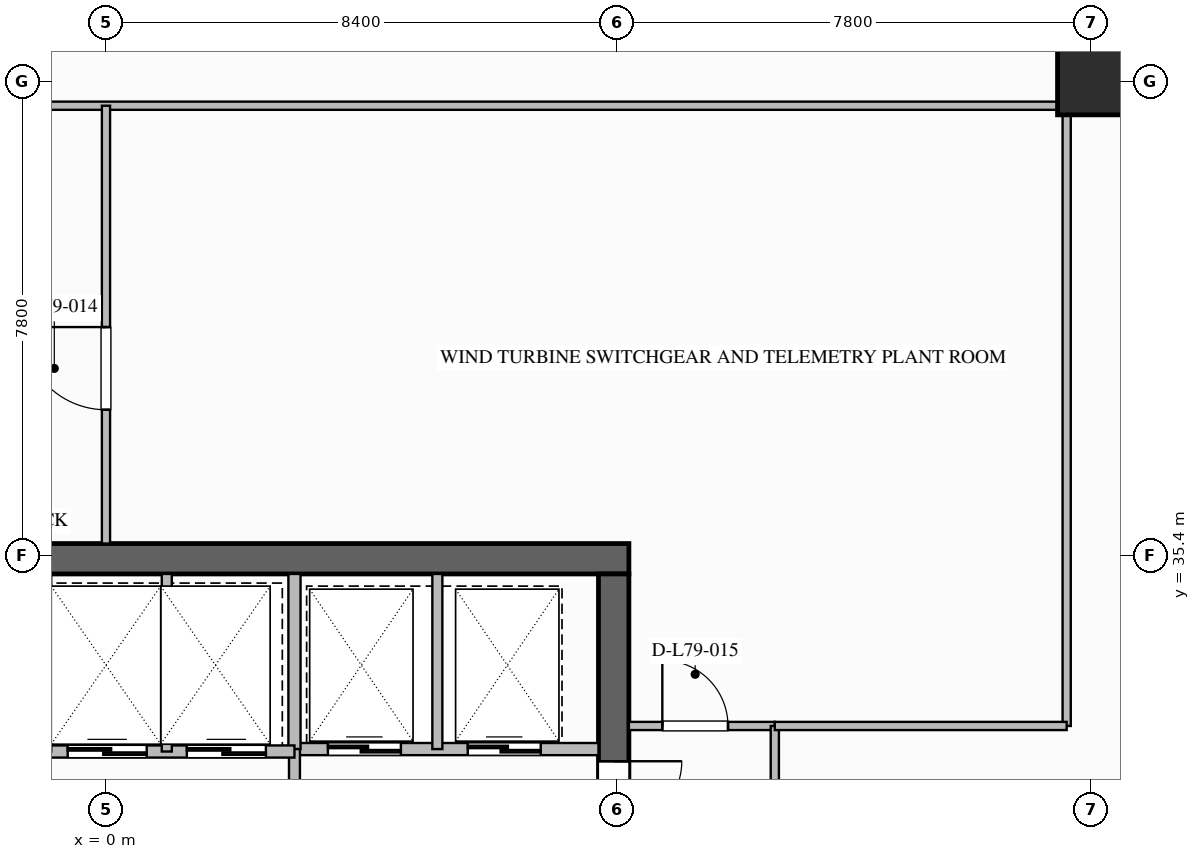
"""IFC4 building model, lengths in metres.
Left out: names, types, materials, properties, quantities, classifications, styles, units other than length and angle.
Written with IfcOpenShell. Run it as: python <this file> out.ifc"""

import sys

from ifc_helpers import new_model, si_unit, direction, frame, frame_2d, origin, origin_2d, place, context, subcontext, project, spatial, rectangle, extrude, element, fill, save


model = new_model("IFC4")
c1 = context("Model", 3, precision=1e-05, world=origin(), true_north=direction((0.0, 1.0)))
c2 = subcontext(c1, "Body", "Model", "MODEL_VIEW")
j1 = project(units=[si_unit("LENGTHUNIT", "METRE"), si_unit("PLANEANGLEUNIT", "RADIAN")], contexts=[c1])
p1 = place(None, origin())
s1 = spatial("IfcSite", under=j1, at=p1, CompositionType="ELEMENT")
p2 = place(p1, origin())
s2 = spatial("IfcBuilding", under=s1, at=p2, CompositionType="ELEMENT")
p3 = place(p2, frame((0.0, 0.0, 303.0)))
s3 = spatial("IfcBuildingStorey", under=s2, at=p3, CompositionType="ELEMENT", Elevation=303.0)
p4 = place(p3, frame((-8.6, 35.35, 0.0), z_axis=(0.0, 0.0, 1.0), x_axis=(1.0, 0.0, 0.0)))
e1 = element("IfcWall", 1, at=p4, inside=s3, PredefinedType="SHEAR", context=c2, shape_type="SweptSolid", body=[
    extrude(rectangle(XDim=17.2, YDim=0.5, at=frame_2d((8.6, 0.0))), origin(), (0.0, 0.0, 1.0), 4.2),
])
p5 = place(p3, frame((8.35, 35.1, 0.0), z_axis=(0.0, 0.0, 1.0), x_axis=(0.0, -1.0, 0.0)))
e2 = element("IfcWall", 2, at=p5, inside=s3, PredefinedType="SHEAR", context=c2, shape_type="SweptSolid", body=[
    extrude(rectangle(XDim=16.2, YDim=0.5, at=frame_2d((8.1, 0.0))), origin(), (0.0, 0.0, 1.0), 4.2),
])
p6 = place(p5, frame((3.08, 0.0, 0.0)))
e3 = element("IfcOpeningElement", 3, at=p6, cuts=e2, PredefinedType="OPENING", context=c2, shape_type="SweptSolid", body=[
    extrude(rectangle(XDim=1.12, YDim=2.1, at=frame_2d((0.56, 1.05))), frame((0.0, 0.26, 0.0), z_axis=(0.0, -1.0, 0.0), x_axis=(1.0, 0.0, 0.0)), (0.0, 0.0, 1.0), 0.52),
])
p7 = place(p5, frame((10.62, 0.0, 0.0)))
e4 = element("IfcOpeningElement", 4, at=p7, cuts=e2, PredefinedType="OPENING", context=c2, shape_type="SweptSolid", body=[
    extrude(rectangle(XDim=1.08, YDim=2.04, at=frame_2d((0.54, 1.02))), frame((0.0, 0.26, 0.0), z_axis=(0.0, -1.0, 0.0), x_axis=(1.0, 0.0, 0.0)), (0.0, 0.0, 1.0), 0.52),
])
p8 = place(p3, frame((16.2, 43.2, 0.0), z_axis=(0.0, 0.0, 1.0), x_axis=(1.0, 0.0, 0.0)))
e5 = element("IfcColumn", 5, at=p8, inside=s3, PredefinedType="COLUMN", context=c2, shape_type="SweptSolid", body=[
    extrude(rectangle(XDim=1.1, YDim=1.1, at=origin_2d()), origin(), (0.0, 0.0, 1.0), 4.2),
])
p9 = place(p3, frame((3.1, 32.22, 0.0), z_axis=(0.0, 0.0, 1.0), x_axis=(1.0, 0.0, 0.0)))
e6 = element("IfcWall", 6, at=p9, inside=s3, PredefinedType="SOLIDWALL", context=c2, shape_type="SweptSolid", body=[
    extrude(rectangle(XDim=5.0, YDim=0.2, at=frame_2d((2.5, 0.0))), origin(), (0.0, 0.0, 1.0), 3.85),
])
p10 = place(p9, frame((0.55, 0.0, 0.0)))
e7 = element("IfcOpeningElement", 7, at=p10, cuts=e6, PredefinedType="OPENING", context=c2, shape_type="SweptSolid", body=[
    extrude(rectangle(XDim=1.2, YDim=2.2, at=frame_2d((0.6, 1.1))), frame((0.0, 0.11, 0.0), z_axis=(0.0, -1.0, 0.0), x_axis=(1.0, 0.0, 0.0)), (0.0, 0.0, 1.0), 0.22),
])
p11 = place(p9, frame((2.85, 0.0, 0.0)))
e8 = element("IfcOpeningElement", 8, at=p11, cuts=e6, PredefinedType="OPENING", context=c2, shape_type="SweptSolid", body=[
    extrude(rectangle(XDim=1.2, YDim=2.2, at=frame_2d((0.6, 1.1))), frame((0.0, 0.11, 0.0), z_axis=(0.0, -1.0, 0.0), x_axis=(1.0, 0.0, 0.0)), (0.0, 0.0, 1.0), 0.22),
])
p12 = place(p3, frame((3.1, 32.22, 0.0), z_axis=(0.0, 0.0, 1.0), x_axis=(0.0, 1.0, 0.0)))
e9 = element("IfcWall", 9, at=p12, inside=s3, PredefinedType="SOLIDWALL", context=c2, shape_type="SweptSolid", body=[
    extrude(rectangle(XDim=2.88, YDim=0.2, at=frame_2d((1.44, 0.0))), origin(), (0.0, 0.0, 1.0), 3.85),
])
p13 = place(p3, frame((5.45, 32.22, 0.0), z_axis=(0.0, 0.0, 1.0), x_axis=(0.0, 1.0, 0.0)))
e10 = element("IfcWall", 10, at=p13, inside=s3, PredefinedType="PARTITIONING", context=c2, shape_type="SweptSolid", body=[
    extrude(rectangle(XDim=2.88, YDim=0.165, at=frame_2d((1.44, 0.0))), origin(), (0.0, 0.0, 1.0), 3.85),
])
p14 = place(p3, frame((3.1, 28.16, 0.0), z_axis=(0.0, 0.0, 1.0), x_axis=(0.0, 1.0, 0.0)))
e11 = element("IfcWall", 11, at=p14, inside=s3, PredefinedType="SOLIDWALL", context=c2, shape_type="SweptSolid", body=[
    extrude(rectangle(XDim=4.06, YDim=0.18, at=frame_2d((2.03, 0.0))), origin(), (0.0, 0.0, 1.0), 3.85),
])
p15 = place(p14, frame((1.4, 0.0, 0.0)))
e12 = element("IfcOpeningElement", 12, at=p15, cuts=e11, PredefinedType="OPENING", context=c2, shape_type="SweptSolid", body=[
    extrude(rectangle(XDim=1.12, YDim=2.1, at=frame_2d((0.56, 1.05))), frame((0.0, 0.1, 0.0), z_axis=(0.0, -1.0, 0.0), x_axis=(1.0, 0.0, 0.0)), (0.0, 0.0, 1.0), 0.2),
])
p16 = place(p3, frame((-1.0, 32.18, 0.0), z_axis=(0.0, 0.0, 1.0), x_axis=(1.0, 0.0, 0.0)))
e13 = element("IfcWall", 13, at=p16, inside=s3, PredefinedType="SOLIDWALL", context=c2, shape_type="SweptSolid", body=[
    extrude(rectangle(XDim=4.1, YDim=0.2, at=frame_2d((2.05, 0.0))), origin(), (0.0, 0.0, 1.0), 3.85),
])
p17 = place(p16, frame((0.37, 0.0, 0.0)))
e14 = element("IfcOpeningElement", 14, at=p17, cuts=e13, PredefinedType="OPENING", context=c2, shape_type="SweptSolid", body=[
    extrude(rectangle(XDim=1.3, YDim=2.2, at=frame_2d((0.65, 1.1))), frame((0.0, 0.11, 0.0), z_axis=(0.0, -1.0, 0.0), x_axis=(1.0, 0.0, 0.0)), (0.0, 0.0, 1.0), 0.22),
])
p18 = place(p16, frame((2.33, 0.0, 0.0)))
e15 = element("IfcOpeningElement", 15, at=p18, cuts=e13, PredefinedType="OPENING", context=c2, shape_type="SweptSolid", body=[
    extrude(rectangle(XDim=1.3, YDim=2.2, at=frame_2d((0.65, 1.1))), frame((0.0, 0.11, 0.0), z_axis=(0.0, -1.0, 0.0), x_axis=(1.0, 0.0, 0.0)), (0.0, 0.0, 1.0), 0.22),
])
p19 = place(p3, frame((1.0, 32.18, 0.0), z_axis=(0.0, 0.0, 1.0), x_axis=(0.0, 1.0, 0.0)))
e16 = element("IfcWall", 16, at=p19, inside=s3, PredefinedType="PARTITIONING", context=c2, shape_type="SweptSolid", body=[
    extrude(rectangle(XDim=2.92, YDim=0.165, at=frame_2d((1.46, 0.0))), origin(), (0.0, 0.0, 1.0), 3.85),
])
p20 = place(p3, frame((8.6, 32.6, 0.0), z_axis=(0.0, 0.0, 1.0), x_axis=(1.0, 0.0, 0.0)))
e17 = element("IfcWall", 17, at=p20, inside=s3, PredefinedType="PARTITIONING", context=c2, shape_type="SweptSolid", body=[
    extrude(rectangle(XDim=2.4, YDim=0.135, at=frame_2d((1.2, 0.0))), origin(), (0.0, 0.0, 1.0), 3.85),
])
p21 = place(p20, frame((0.55, 0.0, 0.0)))
e18 = element("IfcOpeningElement", 18, at=p21, cuts=e17, PredefinedType="OPENING", context=c2, shape_type="SweptSolid", body=[
    extrude(rectangle(XDim=1.08, YDim=2.04, at=frame_2d((0.54, 1.02))), frame((0.0, 0.077, 0.0), z_axis=(0.0, -1.0, 0.0), x_axis=(1.0, 0.0, 0.0)), (0.0, 0.0, 1.0), 0.155),
])
p22 = place(p3, frame((11.0, 32.6, 0.0), z_axis=(0.0, 0.0, 1.0), x_axis=(0.0, -1.0, 0.0)))
e19 = element("IfcWall", 19, at=p22, inside=s3, PredefinedType="PARTITIONING", context=c2, shape_type="SweptSolid", body=[
    extrude(rectangle(XDim=10.2, YDim=0.135, at=frame_2d((5.1, 0.0))), origin(), (0.0, 0.0, 1.0), 3.85),
])
p23 = place(p22, frame((1.6, 0.0, 0.0)))
e20 = element("IfcOpeningElement", 20, at=p23, cuts=e19, PredefinedType="OPENING", context=c2, shape_type="SweptSolid", body=[
    extrude(rectangle(XDim=1.15, YDim=2.15, at=frame_2d((0.575, 1.075))), frame((0.0, 0.077, 0.0), z_axis=(0.0, -1.0, 0.0), x_axis=(1.0, 0.0, 0.0)), (0.0, 0.0, 1.0), 0.155),
])
p24 = place(p3, frame((-15.8, 42.8, 0.0), z_axis=(0.0, 0.0, 1.0), x_axis=(1.0, 0.0, 0.0)))
e21 = element("IfcWall", 21, at=p24, inside=s3, PredefinedType="PARTITIONING", context=c2, shape_type="SweptSolid", body=[
    extrude(rectangle(XDim=31.6, YDim=0.135, at=frame_2d((15.8, 0.0))), origin(), (0.0, 0.0, 1.0), 3.85),
])
p25 = place(p3, frame((15.8, 32.6, 0.0), z_axis=(0.0, 0.0, 1.0), x_axis=(0.0, 1.0, 0.0)))
e22 = element("IfcWall", 22, at=p25, inside=s3, PredefinedType="PARTITIONING", context=c2, shape_type="SweptSolid", body=[
    extrude(rectangle(XDim=10.2, YDim=0.135, at=frame_2d((5.1, 0.0))), origin(), (0.0, 0.0, 1.0), 3.85),
])
p26 = place(p3, frame((11.0, 32.6, 0.0), z_axis=(0.0, 0.0, 1.0), x_axis=(1.0, 0.0, 0.0)))
e23 = element("IfcWall", 23, at=p26, inside=s3, PredefinedType="PARTITIONING", context=c2, shape_type="SweptSolid", body=[
    extrude(rectangle(XDim=4.8, YDim=0.135, at=frame_2d((2.4, 0.0))), origin(), (0.0, 0.0, 1.0), 3.85),
])
p27 = place(p3, frame((0.0, 35.6, 0.0), z_axis=(0.0, 0.0, 1.0), x_axis=(0.0, 1.0, 0.0)))
e24 = element("IfcWall", 24, at=p27, inside=s3, PredefinedType="PARTITIONING", context=c2, shape_type="SweptSolid", body=[
    extrude(rectangle(XDim=7.2, YDim=0.135, at=frame_2d((3.6, 0.0))), origin(), (0.0, 0.0, 1.0), 3.227),
])
p28 = place(p27, frame((2.2, 0.0, 0.0)))
e25 = element("IfcOpeningElement", 25, at=p28, cuts=e24, PredefinedType="OPENING", context=c2, shape_type="SweptSolid", body=[
    extrude(rectangle(XDim=1.36, YDim=2.2, at=frame_2d((0.68, 1.1))), frame((0.0, 0.077, 0.0), z_axis=(0.0, -1.0, 0.0), x_axis=(1.0, 0.0, 0.0)), (0.0, 0.0, 1.0), 0.155),
])
p29 = place(p10, origin())
e26 = element("IfcDoor", 26, at=p29, inside=s3, OperationType="SLIDING_TO_LEFT", PredefinedType="DOOR", context=c2, shape_type="SweptSolid", body=[
    extrude(rectangle(XDim=1.2, YDim=2.2, at=frame_2d((0.6, 1.1))), frame((0.0, 0.025, 0.0), z_axis=(0.0, -1.0, 0.0), x_axis=(1.0, 0.0, 0.0)), (0.0, 0.0, 1.0), 0.05),
])
fill(e7, e26)
p30 = place(p11, origin())
e27 = element("IfcDoor", 27, at=p30, inside=s3, OperationType="SLIDING_TO_LEFT", PredefinedType="DOOR", context=c2, shape_type="SweptSolid", body=[
    extrude(rectangle(XDim=1.2, YDim=2.2, at=frame_2d((0.6, 1.1))), frame((0.0, 0.025, 0.0), z_axis=(0.0, -1.0, 0.0), x_axis=(1.0, 0.0, 0.0)), (0.0, 0.0, 1.0), 0.05),
])
fill(e8, e27)
p31 = place(p6, origin())
e28 = element("IfcDoor", 28, at=p31, inside=s3, OperationType="SINGLE_SWING_LEFT", PredefinedType="DOOR", context=c2, shape_type="SweptSolid", body=[
    extrude(rectangle(XDim=1.12, YDim=2.1, at=frame_2d((0.56, 1.05))), frame((0.0, 0.025, 0.0), z_axis=(0.0, -1.0, 0.0), x_axis=(1.0, 0.0, 0.0)), (0.0, 0.0, 1.0), 0.05),
])
fill(e3, e28)
p32 = place(p17, origin())
e29 = element("IfcDoor", 29, at=p32, inside=s3, OperationType="SLIDING_TO_LEFT", PredefinedType="DOOR", context=c2, shape_type="SweptSolid", body=[
    extrude(rectangle(XDim=1.3, YDim=2.2, at=frame_2d((0.65, 1.1))), frame((0.0, 0.025, 0.0), z_axis=(0.0, -1.0, 0.0), x_axis=(1.0, 0.0, 0.0)), (0.0, 0.0, 1.0), 0.05),
])
fill(e14, e29)
p33 = place(p18, origin())
e30 = element("IfcDoor", 30, at=p33, inside=s3, OperationType="SLIDING_TO_LEFT", PredefinedType="DOOR", context=c2, shape_type="SweptSolid", body=[
    extrude(rectangle(XDim=1.3, YDim=2.2, at=frame_2d((0.65, 1.1))), frame((0.0, 0.025, 0.0), z_axis=(0.0, -1.0, 0.0), x_axis=(1.0, 0.0, 0.0)), (0.0, 0.0, 1.0), 0.05),
])
fill(e15, e30)
p34 = place(p28, origin())
e31 = element("IfcDoor", 31, at=p34, inside=s3, OperationType="SINGLE_SWING_RIGHT", PredefinedType="DOOR", context=c2, shape_type="SweptSolid", body=[
    extrude(rectangle(XDim=1.36, YDim=2.2, at=frame_2d((0.68, 1.1))), frame((0.0, 0.025, 0.0), z_axis=(0.0, -1.0, 0.0), x_axis=(1.0, 0.0, 0.0)), (0.0, 0.0, 1.0), 0.05),
])
fill(e25, e31)
p35 = place(p21, origin())
e32 = element("IfcDoor", 32, at=p35, inside=s3, OperationType="SINGLE_SWING_LEFT", PredefinedType="DOOR", context=c2, shape_type="SweptSolid", body=[
    extrude(rectangle(XDim=1.08, YDim=2.04, at=frame_2d((0.54, 1.02))), frame((0.0, 0.025, 0.0), z_axis=(0.0, -1.0, 0.0), x_axis=(1.0, 0.0, 0.0)), (0.0, 0.0, 1.0), 0.05),
])
fill(e18, e32)
save(model, sys.argv[1])
